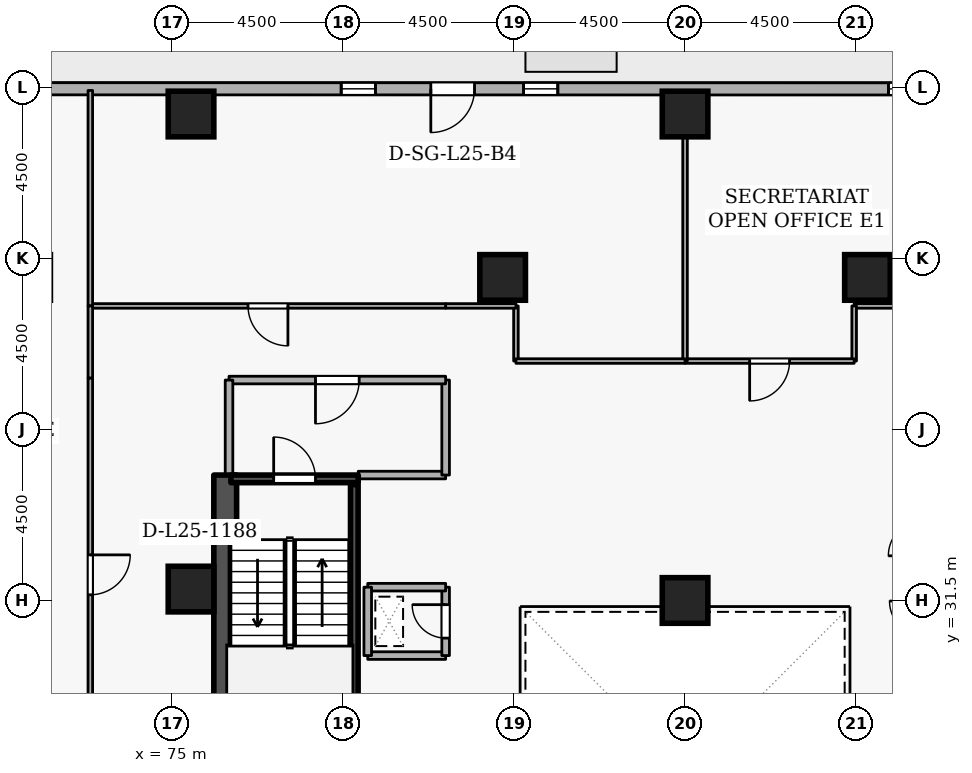
"""IFC4 building model, lengths in metres.
Left out: names, types, materials, properties, quantities, classifications, styles, units other than length and angle.
Written with IfcOpenShell. Run it as: python <this file> out.ifc"""

import sys

from ifc_helpers import new_model, si_unit, direction, frame, frame_2d, origin, origin_2d, place, context, subcontext, project, spatial, rectangle, extrude, element, fill, save


model = new_model("IFC4")
c1 = context("Model", 3, precision=1e-05, world=origin(), true_north=direction((0.0, 1.0)))
c2 = subcontext(c1, "Body", "Model", "MODEL_VIEW")
j1 = project(units=[si_unit("LENGTHUNIT", "METRE"), si_unit("PLANEANGLEUNIT", "RADIAN")], contexts=[c1])
p1 = place(None, origin())
s1 = spatial("IfcSite", under=j1, at=p1, CompositionType="ELEMENT")
p2 = place(p1, origin())
s2 = spatial("IfcBuilding", under=s1, at=p2, CompositionType="ELEMENT")
p3 = place(p2, frame((0.0, 0.0, 98.1)))
s3 = spatial("IfcBuildingStorey", under=s2, at=p3, CompositionType="ELEMENT", Elevation=98.1)
p4 = place(p3, frame((76.4, 19.2, 0.0), z_axis=(0.0, 0.0, 1.0), x_axis=(0.0, 1.0, 0.0)))
e1 = element("IfcWall", 1, at=p4, inside=s3, PredefinedType="SHEAR", context=c2, shape_type="SweptSolid", body=[
    extrude(rectangle(XDim=15.6, YDim=0.6, at=frame_2d((7.8, 0.0))), origin(), (0.0, 0.0, 1.0), 3.6),
])
for number, where, z_axis, x_axis in (
    (2, (88.5, 44.3, 0.0), (0.0, 0.0, 1.0), (1.0, 0.0, 0.0)),
    (3, (75.5, 44.3, 0.0), (0.0, 0.0, 1.0), (1.0, 0.0, 0.0)),
    (4, (93.3, 40.0, 0.0), (0.0, 0.0, 1.0), (1.0, 0.0, 0.0)),
    (5, (83.7, 40.0, 0.0), (0.0, 0.0, 1.0), (1.0, 0.0, 0.0)),
    (6, (75.5, 31.8, 0.0), (0.0, 0.0, 1.0), (1.0, 0.0, 0.0)),
    (7, (88.5, 31.5, 0.0), (0.0, 0.0, 1.0), (1.0, 0.0, 0.0)),
):
    element("IfcColumn", number, at=place(p3, frame(where, z_axis=z_axis, x_axis=x_axis)), inside=s3, PredefinedType="COLUMN", context=c2, shape_type="SweptSolid", body=[
        extrude(rectangle(XDim=1.2, YDim=1.2, at=origin_2d()), origin(), (0.0, 0.0, 1.0), 3.6),
    ])
p5 = place(p3, frame((102.252, 44.959, 0.0), z_axis=(0.0, 0.0, 1.0), x_axis=(-0.999999989352, 0.000145929605, 0.0)))
e8 = element("IfcWall", 8, at=p5, inside=s3, PredefinedType="STANDARD", context=c2, shape_type="SweptSolid", body=[
    extrude(rectangle(XDim=35.133, YDim=0.32, at=frame_2d((17.566, 0.0))), origin(), (0.0, 0.0, 1.0), 2.7),
])
p6 = place(p5, frame((19.292, 0.0, 0.0)))
e9 = element("IfcOpeningElement", 9, at=p6, cuts=e8, PredefinedType="OPENING", context=c2, shape_type="SweptSolid", body=[
    extrude(rectangle(XDim=1.15, YDim=2.1, at=frame_2d((0.575, 1.05))), frame((0.0, 0.17, 0.0), z_axis=(0.0, -1.0, 0.0), x_axis=(1.0, 0.0, 0.0)), (0.0, 0.0, 1.0), 0.34),
])
p7 = place(p5, frame((2.7, 0.0, 0.72)))
e10 = element("IfcOpeningElement", 10, at=p7, cuts=e8, PredefinedType="OPENING", context=c2, shape_type="SweptSolid", body=[
    extrude(rectangle(XDim=0.9, YDim=1.75, at=frame_2d((0.45, 0.875))), frame((0.0, 0.17, 0.0), z_axis=(0.0, -1.0, 0.0), x_axis=(1.0, 0.0, 0.0)), (0.0, 0.0, 1.0), 0.34),
])
p8 = place(p5, frame((7.5, 0.0, 0.72)))
e11 = element("IfcOpeningElement", 11, at=p8, cuts=e8, PredefinedType="OPENING", context=c2, shape_type="SweptSolid", body=[
    extrude(rectangle(XDim=0.9, YDim=1.75, at=frame_2d((0.45, 0.875))), frame((0.0, 0.17, 0.0), z_axis=(0.0, -1.0, 0.0), x_axis=(1.0, 0.0, 0.0)), (0.0, 0.0, 1.0), 0.34),
])
p9 = place(p5, frame((17.1, 0.0, 0.72)))
e12 = element("IfcOpeningElement", 12, at=p9, cuts=e8, PredefinedType="OPENING", context=c2, shape_type="SweptSolid", body=[
    extrude(rectangle(XDim=0.9, YDim=1.75, at=frame_2d((0.45, 0.875))), frame((0.0, 0.17, 0.0), z_axis=(0.0, -1.0, 0.0), x_axis=(1.0, 0.0, 0.0)), (0.0, 0.0, 1.0), 0.34),
])
p10 = place(p5, frame((21.9, 0.0, 0.72)))
e13 = element("IfcOpeningElement", 13, at=p10, cuts=e8, PredefinedType="OPENING", context=c2, shape_type="SweptSolid", body=[
    extrude(rectangle(XDim=0.9, YDim=1.75, at=frame_2d((0.45, 0.875))), frame((0.0, 0.17, 0.0), z_axis=(0.0, -1.0, 0.0), x_axis=(1.0, 0.0, 0.0)), (0.0, 0.0, 1.0), 0.34),
])
p11 = place(p5, frame((31.5, 0.0, 0.72)))
e14 = element("IfcOpeningElement", 14, at=p11, cuts=e8, PredefinedType="OPENING", context=c2, shape_type="SweptSolid", body=[
    extrude(rectangle(XDim=0.9, YDim=1.75, at=frame_2d((0.45, 0.875))), frame((0.0, 0.17, 0.0), z_axis=(0.0, -1.0, 0.0), x_axis=(1.0, 0.0, 0.0)), (0.0, 0.0, 1.0), 0.34),
])
p12 = place(p3, frame((76.55, 34.7, 0.0), z_axis=(0.0, 0.0, 1.0), x_axis=(1.0, 0.0, 0.0)))
e15 = element("IfcWall", 15, at=p12, inside=s3, PredefinedType="SHEAR", context=c2, shape_type="SweptSolid", body=[
    extrude(rectangle(XDim=3.35, YDim=0.2, at=frame_2d((1.675, 0.0))), origin(), (0.0, 0.0, 1.0), 3.6),
])
p13 = place(p12, frame((1.125, 0.0, 0.0)))
e16 = element("IfcOpeningElement", 16, at=p13, cuts=e15, PredefinedType="OPENING", context=c2, shape_type="SweptSolid", body=[
    extrude(rectangle(XDim=1.1, YDim=2.1, at=frame_2d((0.55, 1.05))), frame((0.0, 0.11, 0.0), z_axis=(0.0, -1.0, 0.0), x_axis=(1.0, 0.0, 0.0)), (0.0, 0.0, 1.0), 0.22),
])
p14 = place(p3, frame((79.797, 27.45, 0.0), z_axis=(0.0, 0.0, 1.0), x_axis=(0.0, 1.0, 0.0)))
e17 = element("IfcWall", 17, at=p14, inside=s3, PredefinedType="SHEAR", context=c2, shape_type="SweptSolid", body=[
    extrude(rectangle(XDim=7.1, YDim=0.2, at=frame_2d((3.55, 0.0))), origin(), (0.0, 0.0, 1.0), 3.6),
])
p15 = place(p3, frame((79.9, 34.8, 0.0), z_axis=(0.0, 0.0, 1.0), x_axis=(1.0, 0.0, 0.0)))
e18 = element("IfcWall", 18, at=p15, inside=s3, PredefinedType="STANDARD", context=c2, shape_type="SweptSolid", body=[
    extrude(rectangle(XDim=2.3, YDim=0.2, at=frame_2d((1.15, 0.0))), origin(), (0.0, 0.0, 1.0), 2.505),
])
p16 = place(p3, frame((82.2, 34.8, 0.0), z_axis=(0.0, 0.0, 1.0), x_axis=(0.0, 1.0, 0.0)))
e19 = element("IfcWall", 19, at=p16, inside=s3, PredefinedType="STANDARD", context=c2, shape_type="SweptSolid", body=[
    extrude(rectangle(XDim=2.5, YDim=0.2, at=frame_2d((1.25, 0.0))), origin(), (0.0, 0.0, 1.0), 3.3),
])
p17 = place(p3, frame((82.2, 37.3, 0.0), z_axis=(0.0, 0.0, 1.0), x_axis=(-1.0, 0.0, 0.0)))
e20 = element("IfcWall", 20, at=p17, inside=s3, PredefinedType="STANDARD", context=c2, shape_type="SweptSolid", body=[
    extrude(rectangle(XDim=5.7, YDim=0.2, at=frame_2d((2.85, 0.0))), origin(), (0.0, 0.0, 1.0), 3.3),
])
p18 = place(p17, frame((2.275, 0.0, 0.0)))
e21 = element("IfcOpeningElement", 21, at=p18, cuts=e20, PredefinedType="OPENING", context=c2, shape_type="SweptSolid", body=[
    extrude(rectangle(XDim=1.15, YDim=2.1, at=frame_2d((0.575, 1.05))), frame((0.0, 0.11, 0.0), z_axis=(0.0, -1.0, 0.0), x_axis=(1.0, 0.0, 0.0)), (0.0, 0.0, 1.0), 0.22),
])
p19 = place(p3, frame((76.5, 37.3, 0.0), z_axis=(0.0, 0.0, 1.0), x_axis=(0.0, -1.0, 0.0)))
e22 = element("IfcWall", 22, at=p19, inside=s3, PredefinedType="STANDARD", context=c2, shape_type="SweptSolid", body=[
    extrude(rectangle(XDim=2.5, YDim=0.2, at=frame_2d((1.25, 0.0))), origin(), (0.0, 0.0, 1.0), 3.3),
])
p20 = place(p3, frame((80.15, 30.05, 0.0), z_axis=(0.0, 0.0, 1.0), x_axis=(1.0, 0.0, 0.0)))
e23 = element("IfcWall", 23, at=p20, inside=s3, PredefinedType="STANDARD", context=c2, shape_type="SweptSolid", body=[
    extrude(rectangle(XDim=2.05, YDim=0.2, at=frame_2d((1.025, 0.0))), origin(), (0.0, 0.0, 1.0), 3.3),
])
p21 = place(p3, frame((82.2, 30.05, 0.0), z_axis=(0.0, 0.0, 1.0), x_axis=(0.0, 1.0, 0.0)))
e24 = element("IfcWall", 24, at=p21, inside=s3, PredefinedType="STANDARD", context=c2, shape_type="SweptSolid", body=[
    extrude(rectangle(XDim=1.8, YDim=0.2, at=frame_2d((0.9, 0.0))), origin(), (0.0, 0.0, 1.0), 3.3),
])
p22 = place(p21, frame((0.46, 0.0, 0.0)))
e25 = element("IfcOpeningElement", 25, at=p22, cuts=e24, PredefinedType="OPENING", context=c2, shape_type="SweptSolid", body=[
    extrude(rectangle(XDim=0.88, YDim=2.04, at=frame_2d((0.44, 1.02))), frame((0.0, 0.11, 0.0), z_axis=(0.0, -1.0, 0.0), x_axis=(1.0, 0.0, 0.0)), (0.0, 0.0, 1.0), 0.22),
])
p23 = place(p3, frame((82.2, 31.85, 0.0), z_axis=(0.0, 0.0, 1.0), x_axis=(-1.0, 0.0, 0.0)))
e26 = element("IfcWall", 26, at=p23, inside=s3, PredefinedType="STANDARD", context=c2, shape_type="SweptSolid", body=[
    extrude(rectangle(XDim=2.05, YDim=0.2, at=frame_2d((1.025, 0.0))), origin(), (0.0, 0.0, 1.0), 3.3),
])
p24 = place(p3, frame((80.15, 31.85, 0.0), z_axis=(0.0, 0.0, 1.0), x_axis=(0.0, -1.0, 0.0)))
e27 = element("IfcWall", 27, at=p24, inside=s3, PredefinedType="STANDARD", context=c2, shape_type="SweptSolid", body=[
    extrude(rectangle(XDim=1.8, YDim=0.2, at=frame_2d((0.9, 0.0))), origin(), (0.0, 0.0, 1.0), 3.3),
])
p25 = place(p3, frame((94.8, 39.25, 0.0), z_axis=(0.0, 0.0, 1.0), x_axis=(-1.0, 0.0, 0.0)))
e28 = element("IfcWall", 28, at=p25, inside=s3, PredefinedType="PARTITIONING", context=c2, shape_type="SweptSolid", body=[
    extrude(rectangle(XDim=1.85, YDim=0.12, at=frame_2d((0.925, 0.0))), origin(), (0.0, 0.0, 1.0), 3.3),
])
p26 = place(p3, frame((92.95, 39.25, 0.0), z_axis=(0.0, 0.0, 1.0), x_axis=(0.0, -1.0, 0.0)))
e29 = element("IfcWall", 29, at=p26, inside=s3, PredefinedType="PARTITIONING", context=c2, shape_type="SweptSolid", body=[
    extrude(rectangle(XDim=1.45, YDim=0.12, at=frame_2d((0.725, 0.0))), origin(), (0.0, 0.0, 1.0), 3.3),
])
p27 = place(p3, frame((92.95, 37.8, 0.0), z_axis=(0.0, 0.0, 1.0), x_axis=(-1.0, 0.0, 0.0)))
e30 = element("IfcWall", 30, at=p27, inside=s3, PredefinedType="PARTITIONING", context=c2, shape_type="SweptSolid", body=[
    extrude(rectangle(XDim=4.45, YDim=0.12, at=frame_2d((2.225, 0.0))), origin(), (0.0, 0.0, 1.0), 3.3),
])
p28 = place(p27, frame((1.7, 0.0, 0.0)))
e31 = element("IfcOpeningElement", 31, at=p28, cuts=e30, PredefinedType="OPENING", context=c2, shape_type="SweptSolid", body=[
    extrude(rectangle(XDim=1.05, YDim=2.1, at=frame_2d((0.525, 1.05))), frame((0.0, 0.07, 0.0), z_axis=(0.0, -1.0, 0.0), x_axis=(1.0, 0.0, 0.0)), (0.0, 0.0, 1.0), 0.14),
])
p29 = place(p3, frame((88.5, 37.8, 0.0), z_axis=(0.0, 0.0, 1.0), x_axis=(0.0, 1.0, 0.0)))
e32 = element("IfcWall", 32, at=p29, inside=s3, PredefinedType="PARTITIONING", context=c2, shape_type="SweptSolid", body=[
    extrude(rectangle(XDim=7.12, YDim=0.12, at=frame_2d((3.56, 0.0))), origin(), (0.0, 0.0, 1.0), 2.838),
])
p30 = place(p3, frame((84.05, 37.8, 0.0), z_axis=(0.0, 0.0, 1.0), x_axis=(0.0, 1.0, 0.0)))
e33 = element("IfcWall", 33, at=p30, inside=s3, PredefinedType="PARTITIONING", context=c2, shape_type="SweptSolid", body=[
    extrude(rectangle(XDim=1.45, YDim=0.12, at=frame_2d((0.725, 0.0))), origin(), (0.0, 0.0, 1.0), 3.3),
])
p31 = place(p3, frame((84.05, 39.25, 0.0), z_axis=(0.0, 0.0, 1.0), x_axis=(-1.0, 0.0, 0.0)))
e34 = element("IfcWall", 34, at=p31, inside=s3, PredefinedType="PARTITIONING", context=c2, shape_type="SweptSolid", body=[
    extrude(rectangle(XDim=1.85, YDim=0.12, at=frame_2d((0.925, 0.0))), origin(), (0.0, 0.0, 1.0), 3.3),
])
p32 = place(p3, frame((82.2, 39.25, 0.0), z_axis=(0.0, 0.0, 1.0), x_axis=(-1.0, 0.0, 0.0)))
e35 = element("IfcWall", 35, at=p32, inside=s3, PredefinedType="PARTITIONING", context=c2, shape_type="SweptSolid", body=[
    extrude(rectangle(XDim=9.35, YDim=0.12, at=frame_2d((4.675, 0.0))), origin(), (0.0, 0.0, 1.0), 3.3),
])
p33 = place(p32, frame((4.15, 0.0, 0.0)))
e36 = element("IfcOpeningElement", 36, at=p33, cuts=e35, PredefinedType="OPENING", context=c2, shape_type="SweptSolid", body=[
    extrude(rectangle(XDim=1.05, YDim=2.1, at=frame_2d((0.525, 1.05))), frame((0.0, 0.07, 0.0), z_axis=(0.0, -1.0, 0.0), x_axis=(1.0, 0.0, 0.0)), (0.0, 0.0, 1.0), 0.14),
])
p34 = place(p3, frame((72.85, 39.25, 0.0), z_axis=(0.0, 0.0, 1.0), x_axis=(0.0, 1.0, 0.0)))
e37 = element("IfcWall", 37, at=p34, inside=s3, PredefinedType="PARTITIONING", context=c2, shape_type="SweptSolid", body=[
    extrude(rectangle(XDim=5.67, YDim=0.12, at=frame_2d((2.835, 0.0))), origin(), (0.0, 0.0, 1.0), 3.3),
])
p35 = place(p3, frame((88.5, 37.8, 0.0), z_axis=(0.0, 0.0, 1.0), x_axis=(-1.0, 0.0, 0.0)))
e38 = element("IfcWall", 38, at=p35, inside=s3, PredefinedType="PARTITIONING", context=c2, shape_type="SweptSolid", body=[
    extrude(rectangle(XDim=4.45, YDim=0.12, at=frame_2d((2.225, 0.0))), origin(), (0.0, 0.0, 1.0), 3.3),
])
p36 = place(p3, frame((72.85, 39.25, 0.0), z_axis=(0.0, 0.0, 1.0), x_axis=(0.0, -1.0, 0.0)))
e39 = element("IfcWall", 39, at=p36, inside=s3, PredefinedType="PARTITIONING", context=c2, shape_type="SweptSolid", body=[
    extrude(rectangle(XDim=1.9, YDim=0.12, at=frame_2d((0.95, 0.0))), origin(), (0.0, 0.0, 1.0), 3.3),
])
p37 = place(p3, frame((72.85, 37.35, 0.0), z_axis=(0.0, 0.0, 1.0), x_axis=(0.0, -1.0, 0.0)))
e40 = element("IfcWall", 40, at=p37, inside=s3, PredefinedType="PARTITIONING", context=c2, shape_type="SweptSolid", body=[
    extrude(rectangle(XDim=10.35, YDim=0.12, at=frame_2d((5.175, 0.0))), origin(), (0.0, 0.0, 1.0), 2.855),
])
p38 = place(p37, frame((4.65, 0.0, 0.0)))
e41 = element("IfcOpeningElement", 41, at=p38, cuts=e40, PredefinedType="OPENING", context=c2, shape_type="SweptSolid", body=[
    extrude(rectangle(XDim=1.05, YDim=2.1, at=frame_2d((0.525, 1.05))), frame((0.0, 0.07, 0.0), z_axis=(0.0, -1.0, 0.0), x_axis=(1.0, 0.0, 0.0)), (0.0, 0.0, 1.0), 0.14),
])
p39 = place(p6, origin())
e42 = element("IfcDoor", 42, at=p39, inside=s3, OperationType="SINGLE_SWING_RIGHT", PredefinedType="DOOR", context=c2, shape_type="SweptSolid", body=[
    extrude(rectangle(XDim=1.15, YDim=2.1, at=frame_2d((0.575, 1.05))), frame((0.0, 0.025, 0.0), z_axis=(0.0, -1.0, 0.0), x_axis=(1.0, 0.0, 0.0)), (0.0, 0.0, 1.0), 0.05),
])
fill(e9, e42)
p40 = place(p8, origin())
e43 = element("IfcWindow", 43, at=p40, inside=s3, PartitioningType="SINGLE_PANEL", PredefinedType="WINDOW", context=c2, shape_type="SweptSolid", body=[
    extrude(rectangle(XDim=0.9, YDim=1.75, at=frame_2d((0.45, 0.875))), frame((0.0, 0.03, 0.0), z_axis=(0.0, -1.0, 0.0), x_axis=(1.0, 0.0, 0.0)), (0.0, 0.0, 1.0), 0.06),
])
fill(e11, e43)
p41 = place(p9, origin())
e44 = element("IfcWindow", 44, at=p41, inside=s3, PartitioningType="SINGLE_PANEL", PredefinedType="WINDOW", context=c2, shape_type="SweptSolid", body=[
    extrude(rectangle(XDim=0.9, YDim=1.75, at=frame_2d((0.45, 0.875))), frame((0.0, 0.03, 0.0), z_axis=(0.0, -1.0, 0.0), x_axis=(1.0, 0.0, 0.0)), (0.0, 0.0, 1.0), 0.06),
])
fill(e12, e44)
p42 = place(p10, origin())
e45 = element("IfcWindow", 45, at=p42, inside=s3, PartitioningType="SINGLE_PANEL", PredefinedType="WINDOW", context=c2, shape_type="SweptSolid", body=[
    extrude(rectangle(XDim=0.9, YDim=1.75, at=frame_2d((0.45, 0.875))), frame((0.0, 0.03, 0.0), z_axis=(0.0, -1.0, 0.0), x_axis=(1.0, 0.0, 0.0)), (0.0, 0.0, 1.0), 0.06),
])
fill(e13, e45)
p43 = place(p13, origin())
e46 = element("IfcDoor", 46, at=p43, inside=s3, OperationType="SINGLE_SWING_LEFT", PredefinedType="DOOR", context=c2, shape_type="SweptSolid", body=[
    extrude(rectangle(XDim=1.1, YDim=2.1, at=frame_2d((0.55, 1.05))), frame((0.0, 0.025, 0.0), z_axis=(0.0, -1.0, 0.0), x_axis=(1.0, 0.0, 0.0)), (0.0, 0.0, 1.0), 0.05),
])
fill(e16, e46)
p44 = place(p18, origin())
e47 = element("IfcDoor", 47, at=p44, inside=s3, OperationType="SINGLE_SWING_RIGHT", PredefinedType="DOOR", context=c2, shape_type="SweptSolid", body=[
    extrude(rectangle(XDim=1.15, YDim=2.1, at=frame_2d((0.575, 1.05))), frame((0.0, 0.025, 0.0), z_axis=(0.0, -1.0, 0.0), x_axis=(1.0, 0.0, 0.0)), (0.0, 0.0, 1.0), 0.05),
])
fill(e21, e47)
p45 = place(p22, origin())
e48 = element("IfcDoor", 48, at=p45, inside=s3, OperationType="SINGLE_SWING_RIGHT", PredefinedType="DOOR", context=c2, shape_type="SweptSolid", body=[
    extrude(rectangle(XDim=0.88, YDim=2.04, at=frame_2d((0.44, 1.02))), frame((0.0, 0.025, 0.0), z_axis=(0.0, -1.0, 0.0), x_axis=(1.0, 0.0, 0.0)), (0.0, 0.0, 1.0), 0.05),
])
fill(e25, e48)
p46 = place(p28, origin())
e49 = element("IfcDoor", 49, at=p46, inside=s3, OperationType="SINGLE_SWING_RIGHT", PredefinedType="DOOR", context=c2, shape_type="SweptSolid", body=[
    extrude(rectangle(XDim=1.05, YDim=2.1, at=frame_2d((0.525, 1.05))), frame((0.0, 0.025, 0.0), z_axis=(0.0, -1.0, 0.0), x_axis=(1.0, 0.0, 0.0)), (0.0, 0.0, 1.0), 0.05),
])
fill(e31, e49)
p47 = place(p33, origin())
e50 = element("IfcDoor", 50, at=p47, inside=s3, OperationType="SINGLE_SWING_LEFT", PredefinedType="DOOR", context=c2, shape_type="SweptSolid", body=[
    extrude(rectangle(XDim=1.05, YDim=2.1, at=frame_2d((0.525, 1.05))), frame((0.0, 0.025, 0.0), z_axis=(0.0, -1.0, 0.0), x_axis=(1.0, 0.0, 0.0)), (0.0, 0.0, 1.0), 0.05),
])
fill(e36, e50)
p48 = place(p38, origin())
e51 = element("IfcDoor", 51, at=p48, inside=s3, OperationType="SINGLE_SWING_LEFT", PredefinedType="DOOR", context=c2, shape_type="SweptSolid", body=[
    extrude(rectangle(XDim=1.05, YDim=2.1, at=frame_2d((0.525, 1.05))), frame((0.0, 0.025, 0.0), z_axis=(0.0, -1.0, 0.0), x_axis=(1.0, 0.0, 0.0)), (0.0, 0.0, 1.0), 0.05),
])
fill(e41, e51)
save(model, sys.argv[1])
